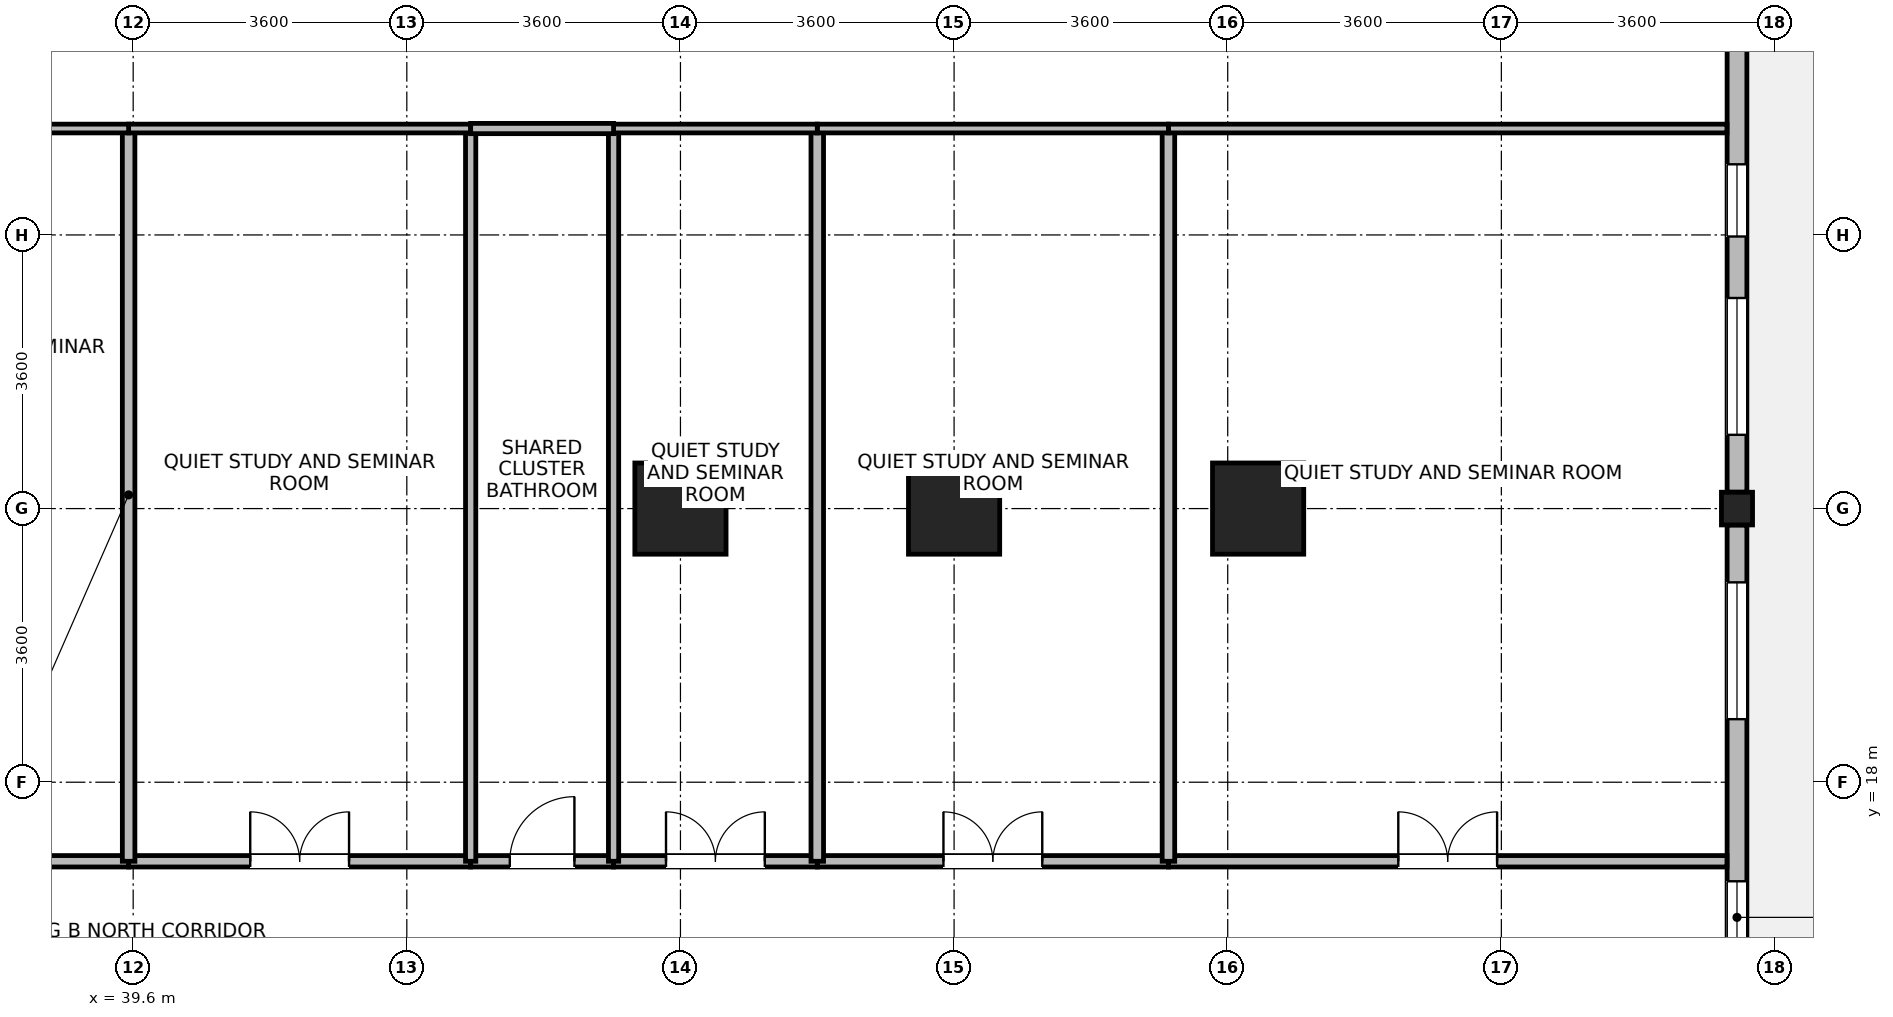
"""IFC4 building model, lengths in metres.
Left out: names, types, materials, properties, quantities, classifications, styles, units other than length and angle.
Written with IfcOpenShell. Run it as: python <this file> out.ifc"""

import sys

from ifc_helpers import new_model, si_unit, direction, frame, frame_2d, origin, origin_2d, place, context, subcontext, project, spatial, rectangle, i_section, extrude, source, transform, mapped, element, fill, save


model = new_model("IFC4")
c1 = context("Model", 3, precision=1e-05, world=origin(), true_north=direction((0.0, 1.0)))
c2 = subcontext(c1, "Body", "Model", "MODEL_VIEW")
j1 = project(units=[si_unit("LENGTHUNIT", "METRE"), si_unit("PLANEANGLEUNIT", "RADIAN")], contexts=[c1])
p1 = place(None, origin())
s1 = spatial("IfcSite", under=j1, at=p1, CompositionType="ELEMENT")
p2 = place(p1, origin())
s2 = spatial("IfcBuilding", under=s1, at=p2, CompositionType="ELEMENT")
p3 = place(p2, frame((0.0, 0.0, 86.0)))
s3 = spatial("IfcBuildingStorey", under=s2, at=p3, CompositionType="ELEMENT", Elevation=86.0)
m1 = source(origin(), c2, "Body", "SweptSolid", [
    extrude(rectangle(XDim=1.2, YDim=1.2, at=origin_2d()), origin(), (0.0, 0.0, 1.0), 3.7),
])
for number, where, z_axis, x_axis in (
    (1, (46.8, 21.6, 0.0), (0.0, 0.0, 1.0), (1.0, 0.0, 0.0)),
    (2, (50.4, 21.6, 0.0), (0.0, 0.0, 1.0), (1.0, 0.0, 0.0)),
    (3, (54.4, 21.6, 0.0), (0.0, 0.0, 1.0), (1.0, 0.0, 0.0)),
):
    element("IfcColumn", number, at=place(p3, frame(where, z_axis=z_axis, x_axis=x_axis)), inside=s3, PredefinedType="COLUMN", context=c2, shape_type="MappedRepresentation", body=[
        mapped(m1, transform((0.0, 0.0, 0.0), x_axis=(1.0, 0.0, 0.0), y_axis=(0.0, 1.0, 0.0), z_axis=(0.0, 0.0, 1.0), scale=1.0)),
    ])
m2 = source(origin(), c2, "Body", "SweptSolid", [
    extrude(i_section(OverallWidth=0.409, OverallDepth=0.43, WebThickness=0.024, FlangeThickness=0.033, FilletRadius=0.015, at=origin_2d()), origin(), (0.0, 0.0, 1.0), 3.7),
])
p4 = place(p3, frame((60.7, 21.6, 0.0), z_axis=(0.0, 0.0, 1.0), x_axis=(1.0, 0.0, 0.0)))
e4 = element("IfcColumn", 4, at=p4, inside=s3, PredefinedType="COLUMN", context=c2, shape_type="MappedRepresentation", body=[
    mapped(m2, transform((0.0, 0.0, 0.0), x_axis=(1.0, 0.0, 0.0), y_axis=(0.0, 1.0, 0.0), z_axis=(0.0, 0.0, 1.0), scale=1.0)),
])
p5 = place(p3, frame((60.7, 21.384, 0.0), z_axis=(0.0, 0.0, 1.0), x_axis=(0.0, -1.0, 0.0)))
e5 = element("IfcWall", 5, at=p5, inside=s3, PredefinedType="STANDARD", context=c2, shape_type="SweptSolid", body=[
    extrude(rectangle(XDim=6.618, YDim=0.26, at=frame_2d((3.309, 0.0))), origin(), (0.0, 0.0, 1.0), 2.93),
])
p6 = place(p5, frame((0.754, 0.0, 0.85)))
e6 = element("IfcOpeningElement", 6, at=p6, cuts=e5, PredefinedType="OPENING", context=c2, shape_type="SweptSolid", body=[
    extrude(rectangle(XDim=1.8, YDim=1.85, at=frame_2d((0.9, 0.925))), frame((0.0, 0.14, 0.0), z_axis=(0.0, -1.0, 0.0), x_axis=(1.0, 0.0, 0.0)), (0.0, 0.0, 1.0), 0.28),
])
p7 = place(p5, frame((4.687, 0.0, 0.85)))
e7 = element("IfcOpeningElement", 7, at=p7, cuts=e5, PredefinedType="OPENING", context=c2, shape_type="SweptSolid", body=[
    extrude(rectangle(XDim=0.95, YDim=1.75, at=frame_2d((0.475, 0.875))), frame((0.0, 0.14, 0.0), z_axis=(0.0, -1.0, 0.0), x_axis=(1.0, 0.0, 0.0)), (0.0, 0.0, 1.0), 0.28),
])
p8 = place(p3, frame((60.7, 28.434, 0.0), z_axis=(0.0, 0.0, 1.0), x_axis=(0.0, -1.0, 0.0)))
e8 = element("IfcWall", 8, at=p8, inside=s3, PredefinedType="STANDARD", context=c2, shape_type="SweptSolid", body=[
    extrude(rectangle(XDim=6.618, YDim=0.26, at=frame_2d((3.309, 0.0))), origin(), (0.0, 0.0, 1.0), 2.93),
])
p9 = place(p8, frame((4.063, 0.0, 0.85)))
e9 = element("IfcOpeningElement", 9, at=p9, cuts=e8, PredefinedType="OPENING", context=c2, shape_type="SweptSolid", body=[
    extrude(rectangle(XDim=1.8, YDim=1.85, at=frame_2d((0.9, 0.925))), frame((0.0, 0.14, 0.0), z_axis=(0.0, -1.0, 0.0), x_axis=(1.0, 0.0, 0.0)), (0.0, 0.0, 1.0), 0.28),
])
p10 = place(p8, frame((2.305, 0.0, 0.85)))
e10 = element("IfcOpeningElement", 10, at=p10, cuts=e8, PredefinedType="OPENING", context=c2, shape_type="SweptSolid", body=[
    extrude(rectangle(XDim=0.95, YDim=1.75, at=frame_2d((0.475, 0.875))), frame((0.0, 0.14, 0.0), z_axis=(0.0, -1.0, 0.0), x_axis=(1.0, 0.0, 0.0)), (0.0, 0.0, 1.0), 0.28),
])
p11 = place(p3, frame((53.22, 16.96, 0.0), z_axis=(0.0, 0.0, 1.0), x_axis=(1.0, 0.0, 0.0)))
e11 = element("IfcWall", 11, at=p11, inside=s3, PredefinedType="PARTITIONING", context=c2, shape_type="SweptSolid", body=[
    extrude(rectangle(XDim=7.348, YDim=0.15, at=frame_2d((3.674, 0.0))), origin(), (0.0, 0.0, 1.0), 3.43),
])
p12 = place(p11, frame((3.024, 0.0, 0.0)))
e12 = element("IfcOpeningElement", 12, at=p12, cuts=e11, PredefinedType="OPENING", context=c2, shape_type="SweptSolid", body=[
    extrude(rectangle(XDim=1.3, YDim=2.12, at=frame_2d((0.65, 1.06))), frame((0.0, 0.085, 0.0), z_axis=(0.0, -1.0, 0.0), x_axis=(1.0, 0.0, 0.0)), (0.0, 0.0, 1.0), 0.17),
])
p13 = place(p3, frame((48.6, 16.96, 0.0), z_axis=(0.0, 0.0, 1.0), x_axis=(1.0, 0.0, 0.0)))
e13 = element("IfcWall", 13, at=p13, inside=s3, PredefinedType="PARTITIONING", context=c2, shape_type="SweptSolid", body=[
    extrude(rectangle(XDim=4.62, YDim=0.15, at=frame_2d((2.31, 0.0))), origin(), (0.0, 0.0, 1.0), 3.43),
])
p14 = place(p13, frame((1.66, 0.0, 0.0)))
e14 = element("IfcOpeningElement", 14, at=p14, cuts=e13, PredefinedType="OPENING", context=c2, shape_type="SweptSolid", body=[
    extrude(rectangle(XDim=1.3, YDim=2.12, at=frame_2d((0.65, 1.06))), frame((0.0, 0.085, 0.0), z_axis=(0.0, -1.0, 0.0), x_axis=(1.0, 0.0, 0.0)), (0.0, 0.0, 1.0), 0.17),
])
p15 = place(p3, frame((39.54, 16.96, 0.0), z_axis=(0.0, 0.0, 1.0), x_axis=(1.0, 0.0, 0.0)))
e15 = element("IfcWall", 15, at=p15, inside=s3, PredefinedType="PARTITIONING", context=c2, shape_type="SweptSolid", body=[
    extrude(rectangle(XDim=4.5, YDim=0.15, at=frame_2d((2.25, 0.0))), origin(), (0.0, 0.0, 1.0), 3.43),
])
p16 = place(p15, frame((1.6, 0.0, 0.0)))
e16 = element("IfcOpeningElement", 16, at=p16, cuts=e15, PredefinedType="OPENING", context=c2, shape_type="SweptSolid", body=[
    extrude(rectangle(XDim=1.3, YDim=2.12, at=frame_2d((0.65, 1.06))), frame((0.0, 0.085, 0.0), z_axis=(0.0, -1.0, 0.0), x_axis=(1.0, 0.0, 0.0)), (0.0, 0.0, 1.0), 0.17),
])
p17 = place(p3, frame((35.36, 16.96, 0.0), z_axis=(0.0, 0.0, 1.0), x_axis=(1.0, 0.0, 0.0)))
e17 = element("IfcWall", 17, at=p17, inside=s3, PredefinedType="PARTITIONING", context=c2, shape_type="SweptSolid", body=[
    extrude(rectangle(XDim=4.18, YDim=0.15, at=frame_2d((2.09, 0.0))), origin(), (0.0, 0.0, 1.0), 3.43),
])
p18 = place(p3, frame((45.92, 16.96, 0.0), z_axis=(0.0, 0.0, 1.0), x_axis=(1.0, 0.0, 0.0)))
e18 = element("IfcWall", 18, at=p18, inside=s3, PredefinedType="PARTITIONING", context=c2, shape_type="SweptSolid", body=[
    extrude(rectangle(XDim=2.68, YDim=0.15, at=frame_2d((1.34, 0.0))), origin(), (0.0, 0.0, 1.0), 3.43),
])
p19 = place(p18, frame((0.69, 0.0, 0.0)))
e19 = element("IfcOpeningElement", 19, at=p19, cuts=e18, PredefinedType="OPENING", context=c2, shape_type="SweptSolid", body=[
    extrude(rectangle(XDim=1.3, YDim=2.12, at=frame_2d((0.65, 1.06))), frame((0.0, 0.085, 0.0), z_axis=(0.0, -1.0, 0.0), x_axis=(1.0, 0.0, 0.0)), (0.0, 0.0, 1.0), 0.17),
])
p20 = place(p3, frame((44.04, 16.96, 0.0), z_axis=(0.0, 0.0, 1.0), x_axis=(1.0, 0.0, 0.0)))
e20 = element("IfcWall", 20, at=p20, inside=s3, PredefinedType="PARTITIONING", context=c2, shape_type="SweptSolid", body=[
    extrude(rectangle(XDim=1.88, YDim=0.15, at=frame_2d((0.94, 0.0))), origin(), (0.0, 0.0, 1.0), 3.43),
])
p21 = place(p20, frame((0.515, 0.0, 0.0)))
e21 = element("IfcOpeningElement", 21, at=p21, cuts=e20, PredefinedType="OPENING", context=c2, shape_type="SweptSolid", body=[
    extrude(rectangle(XDim=0.85, YDim=2.04, at=frame_2d((0.425, 1.02))), frame((0.0, 0.085, 0.0), z_axis=(0.0, -1.0, 0.0), x_axis=(1.0, 0.0, 0.0)), (0.0, 0.0, 1.0), 0.17),
])
p22 = place(p3, frame((39.54, 16.96, 0.0), z_axis=(0.0, 0.0, 1.0), x_axis=(0.0, 1.0, 0.0)))
e22 = element("IfcWall", 22, at=p22, inside=s3, PredefinedType="PARTITIONING", context=c2, shape_type="SweptSolid", body=[
    extrude(rectangle(XDim=9.64, YDim=0.165, at=frame_2d((4.82, 0.0))), origin(), (0.0, 0.0, 1.0), 3.43),
])
for number, where, z_axis, x_axis in (
    (23, (44.04, 16.96, 0.0), (0.0, 0.0, 1.0), (0.0, 1.0, 0.0)),
    (24, (45.92, 16.96, 0.0), (0.0, 0.0, 1.0), (0.0, 1.0, 0.0)),
):
    element("IfcWall", number, at=place(p3, frame(where, z_axis=z_axis, x_axis=x_axis)), inside=s3, PredefinedType="PARTITIONING", context=c2, shape_type="SweptSolid", body=[
        extrude(rectangle(XDim=9.64, YDim=0.135, at=frame_2d((4.82, 0.0))), origin(), (0.0, 0.0, 1.0), 3.43),
    ])
for number, where, z_axis, x_axis in (
    (25, (48.6, 16.96, 0.0), (0.0, 0.0, 1.0), (0.0, 1.0, 0.0)),
    (26, (53.22, 16.96, 0.0), (0.0, 0.0, 1.0), (0.0, 1.0, 0.0)),
):
    element("IfcWall", number, at=place(p3, frame(where, z_axis=z_axis, x_axis=x_axis)), inside=s3, PredefinedType="PARTITIONING", context=c2, shape_type="SweptSolid", body=[
        extrude(rectangle(XDim=9.64, YDim=0.165, at=frame_2d((4.82, 0.0))), origin(), (0.0, 0.0, 1.0), 3.43),
    ])
p23 = place(p3, frame((53.22, 26.6, 0.0), z_axis=(0.0, 0.0, 1.0), x_axis=(1.0, 0.0, 0.0)))
e27 = element("IfcWall", 27, at=p23, inside=s3, PredefinedType="PARTITIONING", context=c2, shape_type="SweptSolid", body=[
    extrude(rectangle(XDim=7.348, YDim=0.115, at=frame_2d((3.674, 0.0))), origin(), (0.0, 0.0, 1.0), 3.43),
])
p24 = place(p3, frame((48.6, 26.6, 0.0), z_axis=(0.0, 0.0, 1.0), x_axis=(1.0, 0.0, 0.0)))
e28 = element("IfcWall", 28, at=p24, inside=s3, PredefinedType="PARTITIONING", context=c2, shape_type="SweptSolid", body=[
    extrude(rectangle(XDim=4.62, YDim=0.115, at=frame_2d((2.31, 0.0))), origin(), (0.0, 0.0, 1.0), 3.43),
])
p25 = place(p3, frame((39.54, 26.6, 0.0), z_axis=(0.0, 0.0, 1.0), x_axis=(1.0, 0.0, 0.0)))
e29 = element("IfcWall", 29, at=p25, inside=s3, PredefinedType="PARTITIONING", context=c2, shape_type="SweptSolid", body=[
    extrude(rectangle(XDim=4.5, YDim=0.115, at=frame_2d((2.25, 0.0))), origin(), (0.0, 0.0, 1.0), 3.43),
])
p26 = place(p3, frame((35.36, 26.6, 0.0), z_axis=(0.0, 0.0, 1.0), x_axis=(1.0, 0.0, 0.0)))
e30 = element("IfcWall", 30, at=p26, inside=s3, PredefinedType="PARTITIONING", context=c2, shape_type="SweptSolid", body=[
    extrude(rectangle(XDim=4.18, YDim=0.115, at=frame_2d((2.09, 0.0))), origin(), (0.0, 0.0, 1.0), 3.43),
])
p27 = place(p3, frame((45.92, 26.6, 0.0), z_axis=(0.0, 0.0, 1.0), x_axis=(1.0, 0.0, 0.0)))
e31 = element("IfcWall", 31, at=p27, inside=s3, PredefinedType="PARTITIONING", context=c2, shape_type="SweptSolid", body=[
    extrude(rectangle(XDim=2.68, YDim=0.115, at=frame_2d((1.34, 0.0))), origin(), (0.0, 0.0, 1.0), 3.43),
])
p28 = place(p3, frame((44.04, 26.6, 0.0), z_axis=(0.0, 0.0, 1.0), x_axis=(1.0, 0.0, 0.0)))
e32 = element("IfcWall", 32, at=p28, inside=s3, PredefinedType="PARTITIONING", context=c2, shape_type="SweptSolid", body=[
    extrude(rectangle(XDim=1.88, YDim=0.135, at=frame_2d((0.94, 0.0))), origin(), (0.0, 0.0, 1.0), 3.43),
])
p29 = place(p6, origin())
e33 = element("IfcWindow", 33, at=p29, inside=s3, PartitioningType="SINGLE_PANEL", PredefinedType="WINDOW", context=c2, shape_type="SweptSolid", body=[
    extrude(rectangle(XDim=1.8, YDim=1.85, at=frame_2d((0.9, 0.925))), frame((0.0, 0.03, 0.0), z_axis=(0.0, -1.0, 0.0), x_axis=(1.0, 0.0, 0.0)), (0.0, 0.0, 1.0), 0.06),
])
fill(e6, e33)
p30 = place(p7, origin())
e34 = element("IfcWindow", 34, at=p30, inside=s3, PartitioningType="SINGLE_PANEL", PredefinedType="WINDOW", context=c2, shape_type="SweptSolid", body=[
    extrude(rectangle(XDim=0.95, YDim=1.75, at=frame_2d((0.475, 0.875))), frame((0.0, 0.03, 0.0), z_axis=(0.0, -1.0, 0.0), x_axis=(1.0, 0.0, 0.0)), (0.0, 0.0, 1.0), 0.06),
])
fill(e7, e34)
p31 = place(p9, origin())
e35 = element("IfcWindow", 35, at=p31, inside=s3, PartitioningType="SINGLE_PANEL", PredefinedType="WINDOW", context=c2, shape_type="SweptSolid", body=[
    extrude(rectangle(XDim=1.8, YDim=1.85, at=frame_2d((0.9, 0.925))), frame((0.0, 0.03, 0.0), z_axis=(0.0, -1.0, 0.0), x_axis=(1.0, 0.0, 0.0)), (0.0, 0.0, 1.0), 0.06),
])
fill(e9, e35)
p32 = place(p10, origin())
e36 = element("IfcWindow", 36, at=p32, inside=s3, PartitioningType="SINGLE_PANEL", PredefinedType="WINDOW", context=c2, shape_type="SweptSolid", body=[
    extrude(rectangle(XDim=0.95, YDim=1.75, at=frame_2d((0.475, 0.875))), frame((0.0, 0.03, 0.0), z_axis=(0.0, -1.0, 0.0), x_axis=(1.0, 0.0, 0.0)), (0.0, 0.0, 1.0), 0.06),
])
fill(e10, e36)
p33 = place(p12, origin())
e37 = element("IfcDoor", 37, at=p33, inside=s3, OperationType="DOUBLE_DOOR_SINGLE_SWING", PredefinedType="DOOR", context=c2, shape_type="SweptSolid", body=[
    extrude(rectangle(XDim=1.3, YDim=2.12, at=frame_2d((0.65, 1.06))), frame((0.0, 0.025, 0.0), z_axis=(0.0, -1.0, 0.0), x_axis=(1.0, 0.0, 0.0)), (0.0, 0.0, 1.0), 0.05),
])
fill(e12, e37)
p34 = place(p14, origin())
e38 = element("IfcDoor", 38, at=p34, inside=s3, OperationType="DOUBLE_DOOR_SINGLE_SWING", PredefinedType="DOOR", context=c2, shape_type="SweptSolid", body=[
    extrude(rectangle(XDim=1.3, YDim=2.12, at=frame_2d((0.65, 1.06))), frame((0.0, 0.025, 0.0), z_axis=(0.0, -1.0, 0.0), x_axis=(1.0, 0.0, 0.0)), (0.0, 0.0, 1.0), 0.05),
])
fill(e14, e38)
p35 = place(p16, origin())
e39 = element("IfcDoor", 39, at=p35, inside=s3, OperationType="DOUBLE_DOOR_SINGLE_SWING", PredefinedType="DOOR", context=c2, shape_type="SweptSolid", body=[
    extrude(rectangle(XDim=1.3, YDim=2.12, at=frame_2d((0.65, 1.06))), frame((0.0, 0.025, 0.0), z_axis=(0.0, -1.0, 0.0), x_axis=(1.0, 0.0, 0.0)), (0.0, 0.0, 1.0), 0.05),
])
fill(e16, e39)
p36 = place(p19, origin())
e40 = element("IfcDoor", 40, at=p36, inside=s3, OperationType="DOUBLE_DOOR_SINGLE_SWING", PredefinedType="DOOR", context=c2, shape_type="SweptSolid", body=[
    extrude(rectangle(XDim=1.3, YDim=2.12, at=frame_2d((0.65, 1.06))), frame((0.0, 0.025, 0.0), z_axis=(0.0, -1.0, 0.0), x_axis=(1.0, 0.0, 0.0)), (0.0, 0.0, 1.0), 0.05),
])
fill(e19, e40)
p37 = place(p21, origin())
e41 = element("IfcDoor", 41, at=p37, inside=s3, OperationType="SINGLE_SWING_RIGHT", PredefinedType="DOOR", context=c2, shape_type="SweptSolid", body=[
    extrude(rectangle(XDim=0.85, YDim=2.04, at=frame_2d((0.425, 1.02))), frame((0.0, 0.025, 0.0), z_axis=(0.0, -1.0, 0.0), x_axis=(1.0, 0.0, 0.0)), (0.0, 0.0, 1.0), 0.05),
])
fill(e21, e41)
save(model, sys.argv[1])
